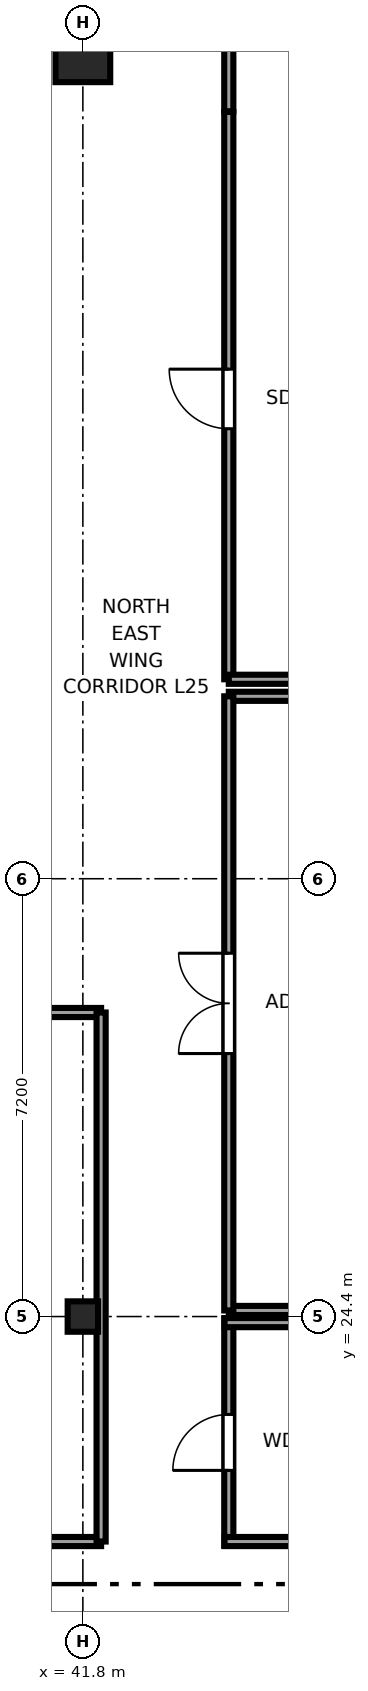
"""IFC4 building model, lengths in metres.
Left out: names, types, materials, properties, quantities, classifications, styles, units other than length and angle.
Written with IfcOpenShell. Run it as: python <this file> out.ifc"""

import sys

from ifc_helpers import new_model, si_unit, direction, frame, frame_2d, origin, origin_2d, place, context, subcontext, project, spatial, rectangle, i_section, extrude, source, transform, mapped, element, fill, save


model = new_model("IFC4")
c1 = context("Model", 3, precision=1e-05, world=origin(), true_north=direction((0.0, 1.0)))
c2 = subcontext(c1, "Body", "Model", "MODEL_VIEW")
j1 = project(units=[si_unit("LENGTHUNIT", "METRE"), si_unit("PLANEANGLEUNIT", "RADIAN")], contexts=[c1])
p1 = place(None, origin())
s1 = spatial("IfcSite", under=j1, at=p1, CompositionType="ELEMENT")
p2 = place(p1, origin())
s2 = spatial("IfcBuilding", under=s1, at=p2, CompositionType="ELEMENT")
p3 = place(p2, frame((0.0, 0.0, 100.9)))
s3 = spatial("IfcBuildingStorey", under=s2, at=p3, CompositionType="ELEMENT", Elevation=100.9)
m1 = source(origin(), c2, "Body", "SweptSolid", [
    extrude(i_section(OverallWidth=0.5, OverallDepth=0.5, WebThickness=0.022, FlangeThickness=0.034, at=origin_2d()), origin(), (0.0, 0.0, 1.0), 3.55),
])
p4 = place(p3, frame((41.8, 24.4, 0.0), z_axis=(0.0, 0.0, 1.0), x_axis=(1.0, 0.0, 0.0)))
e1 = element("IfcColumn", 1, at=p4, inside=s3, PredefinedType="COLUMN", context=c2, shape_type="MappedRepresentation", body=[
    mapped(m1, transform((0.0, 0.0, 0.0), x_axis=(1.0, 0.0, 0.0), y_axis=(0.0, 1.0, 0.0), z_axis=(0.0, 0.0, 1.0), scale=1.0)),
])
m2 = source(origin(), c2, "Body", "SweptSolid", [
    extrude(rectangle(XDim=0.9, YDim=0.9, at=origin_2d()), origin(), (0.0, 0.0, 1.0), 3.55),
])
p5 = place(p3, frame((41.8, 45.15, 0.0), z_axis=(0.0, 0.0, 1.0), x_axis=(1.0, 0.0, 0.0)))
e2 = element("IfcColumn", 2, at=p5, inside=s3, PredefinedType="COLUMN", context=c2, shape_type="MappedRepresentation", body=[
    mapped(m2, transform((0.0, 0.0, 0.0), x_axis=(1.0, 0.0, 0.0), y_axis=(0.0, 1.0, 0.0), z_axis=(0.0, 0.0, 1.0), scale=1.0)),
])
p6 = place(p3, frame((44.2, 20.63, 0.0), z_axis=(0.0, 0.0, 1.0), x_axis=(0.0, 1.0, 0.0)))
e3 = element("IfcWall", 3, at=p6, inside=s3, PredefinedType="PARTITIONING", context=c2, shape_type="SweptSolid", body=[
    extrude(rectangle(XDim=3.74, YDim=0.15, at=frame_2d((1.87, 0.0))), origin(), (0.0, 0.0, 1.0), 3.37),
])
p7 = place(p6, frame((1.24, 0.0, 0.0)))
e4 = element("IfcOpeningElement", 4, at=p7, cuts=e3, PredefinedType="OPENING", context=c2, shape_type="SweptSolid", body=[
    extrude(rectangle(XDim=0.92, YDim=2.01, at=frame_2d((0.46, 1.005))), frame((0.0, 0.085, 0.0), z_axis=(0.0, -1.0, 0.0), x_axis=(1.0, 0.0, 0.0)), (0.0, 0.0, 1.0), 0.17),
])
p8 = place(p3, frame((44.13, 20.7, 0.0), z_axis=(0.0, 0.0, 1.0), x_axis=(1.0, 0.0, 0.0)))
e5 = element("IfcWall", 5, at=p8, inside=s3, PredefinedType="PARTITIONING", context=c2, shape_type="SweptSolid", body=[
    extrude(rectangle(XDim=4.54, YDim=0.15, at=frame_2d((2.27, 0.0))), origin(), (0.0, 0.0, 1.0), 3.37),
])
p9 = place(p3, frame((44.13, 24.3, 0.0), z_axis=(0.0, 0.0, 1.0), x_axis=(1.0, 0.0, 0.0)))
e6 = element("IfcWall", 6, at=p9, inside=s3, PredefinedType="PARTITIONING", context=c2, shape_type="SweptSolid", body=[
    extrude(rectangle(XDim=4.54, YDim=0.15, at=frame_2d((2.27, 0.0))), origin(), (0.0, 0.0, 1.0), 2.748),
])
p10 = place(p3, frame((44.2, 24.5, 0.0), z_axis=(0.0, 0.0, 1.0), x_axis=(1.0, 0.0, 0.0)))
e7 = element("IfcWall", 7, at=p10, inside=s3, PredefinedType="PARTITIONING", context=c2, shape_type="SweptSolid", body=[
    extrude(rectangle(XDim=12.395, YDim=0.15, at=frame_2d((6.198, 0.0))), origin(), (0.0, 0.0, 1.0), 2.748),
])
p11 = place(p3, frame((44.2, 34.6, 0.0), z_axis=(0.0, 0.0, 1.0), x_axis=(1.0, 0.0, 0.0)))
e8 = element("IfcWall", 8, at=p11, inside=s3, PredefinedType="PARTITIONING", context=c2, shape_type="SweptSolid", body=[
    extrude(rectangle(XDim=12.395, YDim=0.15, at=frame_2d((6.198, 0.0))), origin(), (0.0, 0.0, 1.0), 3.37),
])
p12 = place(p3, frame((44.2, 24.5, 0.0), z_axis=(0.0, 0.0, 1.0), x_axis=(0.0, 1.0, 0.0)))
e9 = element("IfcWall", 9, at=p12, inside=s3, PredefinedType="PARTITIONING", context=c2, shape_type="SweptSolid", body=[
    extrude(rectangle(XDim=10.1, YDim=0.15, at=frame_2d((5.05, 0.0))), origin(), (0.0, 0.0, 1.0), 3.37),
])
p13 = place(p12, frame((4.225, 0.0, 0.0)))
e10 = element("IfcOpeningElement", 10, at=p13, cuts=e9, PredefinedType="OPENING", context=c2, shape_type="SweptSolid", body=[
    extrude(rectangle(XDim=1.65, YDim=2.15, at=frame_2d((0.825, 1.075))), frame((0.0, 0.085, 0.0), z_axis=(0.0, -1.0, 0.0), x_axis=(1.0, 0.0, 0.0)), (0.0, 0.0, 1.0), 0.17),
])
p14 = place(p3, frame((44.2, 34.88, 0.0), z_axis=(0.0, 0.0, 1.0), x_axis=(0.0, 1.0, 0.0)))
e11 = element("IfcWall", 11, at=p14, inside=s3, PredefinedType="PARTITIONING", context=c2, shape_type="SweptSolid", body=[
    extrude(rectangle(XDim=9.33, YDim=0.15, at=frame_2d((4.665, 0.0))), origin(), (0.0, 0.0, 1.0), 3.37),
])
p15 = place(p14, frame((4.12, 0.0, 0.0)))
e12 = element("IfcOpeningElement", 12, at=p15, cuts=e11, PredefinedType="OPENING", context=c2, shape_type="SweptSolid", body=[
    extrude(rectangle(XDim=0.98, YDim=2.12, at=frame_2d((0.49, 1.06))), frame((0.0, 0.085, 0.0), z_axis=(0.0, -1.0, 0.0), x_axis=(1.0, 0.0, 0.0)), (0.0, 0.0, 1.0), 0.17),
])
p16 = place(p3, frame((44.2, 34.88, 0.0), z_axis=(0.0, 0.0, 1.0), x_axis=(1.0, 0.0, 0.0)))
e13 = element("IfcWall", 13, at=p16, inside=s3, PredefinedType="PARTITIONING", context=c2, shape_type="SweptSolid", body=[
    extrude(rectangle(XDim=10.03, YDim=0.15, at=frame_2d((5.015, 0.0))), origin(), (0.0, 0.0, 1.0), 3.37),
])
p17 = place(p3, frame((44.2, 44.22, 0.0), z_axis=(0.0, 0.0, 1.0), x_axis=(0.0, 1.0, 0.0)))
e14 = element("IfcWall", 14, at=p17, inside=s3, PredefinedType="PARTITIONING", context=c2, shape_type="SweptSolid", body=[
    extrude(rectangle(XDim=1.375, YDim=0.15, at=frame_2d((0.688, 0.0))), origin(), (0.0, 0.0, 1.0), 3.37),
])
p18 = place(p3, frame((34.6, 20.7, 0.0), z_axis=(0.0, 0.0, 1.0), x_axis=(1.0, 0.0, 0.0)))
e15 = element("IfcWall", 15, at=p18, inside=s3, PredefinedType="PARTITIONING", context=c2, shape_type="SweptSolid", body=[
    extrude(rectangle(XDim=7.5, YDim=0.15, at=frame_2d((3.75, 0.0))), origin(), (0.0, 0.0, 1.0), 3.37),
])
p19 = place(p18, frame((2.925, 0.0, 0.0)))
e16 = element("IfcOpeningElement", 16, at=p19, cuts=e15, PredefinedType="OPENING", context=c2, shape_type="SweptSolid", body=[
    extrude(rectangle(XDim=1.65, YDim=2.15, at=frame_2d((0.825, 1.075))), frame((0.0, 0.085, 0.0), z_axis=(0.0, -1.0, 0.0), x_axis=(1.0, 0.0, 0.0)), (0.0, 0.0, 1.0), 0.17),
])
p20 = place(p3, frame((34.6, 29.4, 0.0), z_axis=(0.0, 0.0, 1.0), x_axis=(1.0, 0.0, 0.0)))
e17 = element("IfcWall", 17, at=p20, inside=s3, PredefinedType="PARTITIONING", context=c2, shape_type="SweptSolid", body=[
    extrude(rectangle(XDim=7.5, YDim=0.15, at=frame_2d((3.75, 0.0))), origin(), (0.0, 0.0, 1.0), 3.37),
])
p21 = place(p3, frame((42.1, 20.7, 0.0), z_axis=(0.0, 0.0, 1.0), x_axis=(0.0, 1.0, 0.0)))
e18 = element("IfcWall", 18, at=p21, inside=s3, PredefinedType="PARTITIONING", context=c2, shape_type="SweptSolid", body=[
    extrude(rectangle(XDim=8.7, YDim=0.15, at=frame_2d((4.35, 0.0))), origin(), (0.0, 0.0, 1.0), 2.16),
])
m3 = source(origin(), c2, "Body", "SweptSolid", [
    extrude(rectangle(XDim=0.92, YDim=2.01, at=frame_2d((0.46, 1.005))), frame((0.0, 0.025, 0.0), z_axis=(0.0, -1.0, 0.0), x_axis=(1.0, 0.0, 0.0)), (0.0, 0.0, 1.0), 0.05),
])
p22 = place(p7, origin())
e19 = element("IfcDoor", 19, at=p22, inside=s3, OperationType="SINGLE_SWING_LEFT", PredefinedType="DOOR", context=c2, shape_type="MappedRepresentation", body=[
    mapped(m3, transform((0.0, 0.0, 0.0), x_axis=(1.0, 0.0, 0.0), y_axis=(0.0, 1.0, 0.0), z_axis=(0.0, 0.0, 1.0), scale=1.0)),
])
fill(e4, e19)
m4 = source(origin(), c2, "Body", "SweptSolid", [
    extrude(rectangle(XDim=1.65, YDim=2.15, at=frame_2d((0.825, 1.075))), frame((0.0, 0.025, 0.0), z_axis=(0.0, -1.0, 0.0), x_axis=(1.0, 0.0, 0.0)), (0.0, 0.0, 1.0), 0.05),
])
p23 = place(p13, origin())
e20 = element("IfcDoor", 20, at=p23, inside=s3, OperationType="DOUBLE_DOOR_SINGLE_SWING", PredefinedType="DOOR", context=c2, shape_type="MappedRepresentation", body=[
    mapped(m4, transform((0.0, 0.0, 0.0), x_axis=(1.0, 0.0, 0.0), y_axis=(0.0, 1.0, 0.0), z_axis=(0.0, 0.0, 1.0), scale=1.0)),
])
fill(e10, e20)
m5 = source(origin(), c2, "Body", "SweptSolid", [
    extrude(rectangle(XDim=0.98, YDim=2.12, at=frame_2d((0.49, 1.06))), frame((0.0, 0.025, 0.0), z_axis=(0.0, -1.0, 0.0), x_axis=(1.0, 0.0, 0.0)), (0.0, 0.0, 1.0), 0.05),
])
p24 = place(p15, origin())
e21 = element("IfcDoor", 21, at=p24, inside=s3, OperationType="SINGLE_SWING_RIGHT", PredefinedType="DOOR", context=c2, shape_type="MappedRepresentation", body=[
    mapped(m5, transform((0.0, 0.0, 0.0), x_axis=(1.0, 0.0, 0.0), y_axis=(0.0, 1.0, 0.0), z_axis=(0.0, 0.0, 1.0), scale=1.0)),
])
fill(e12, e21)
save(model, sys.argv[1])
